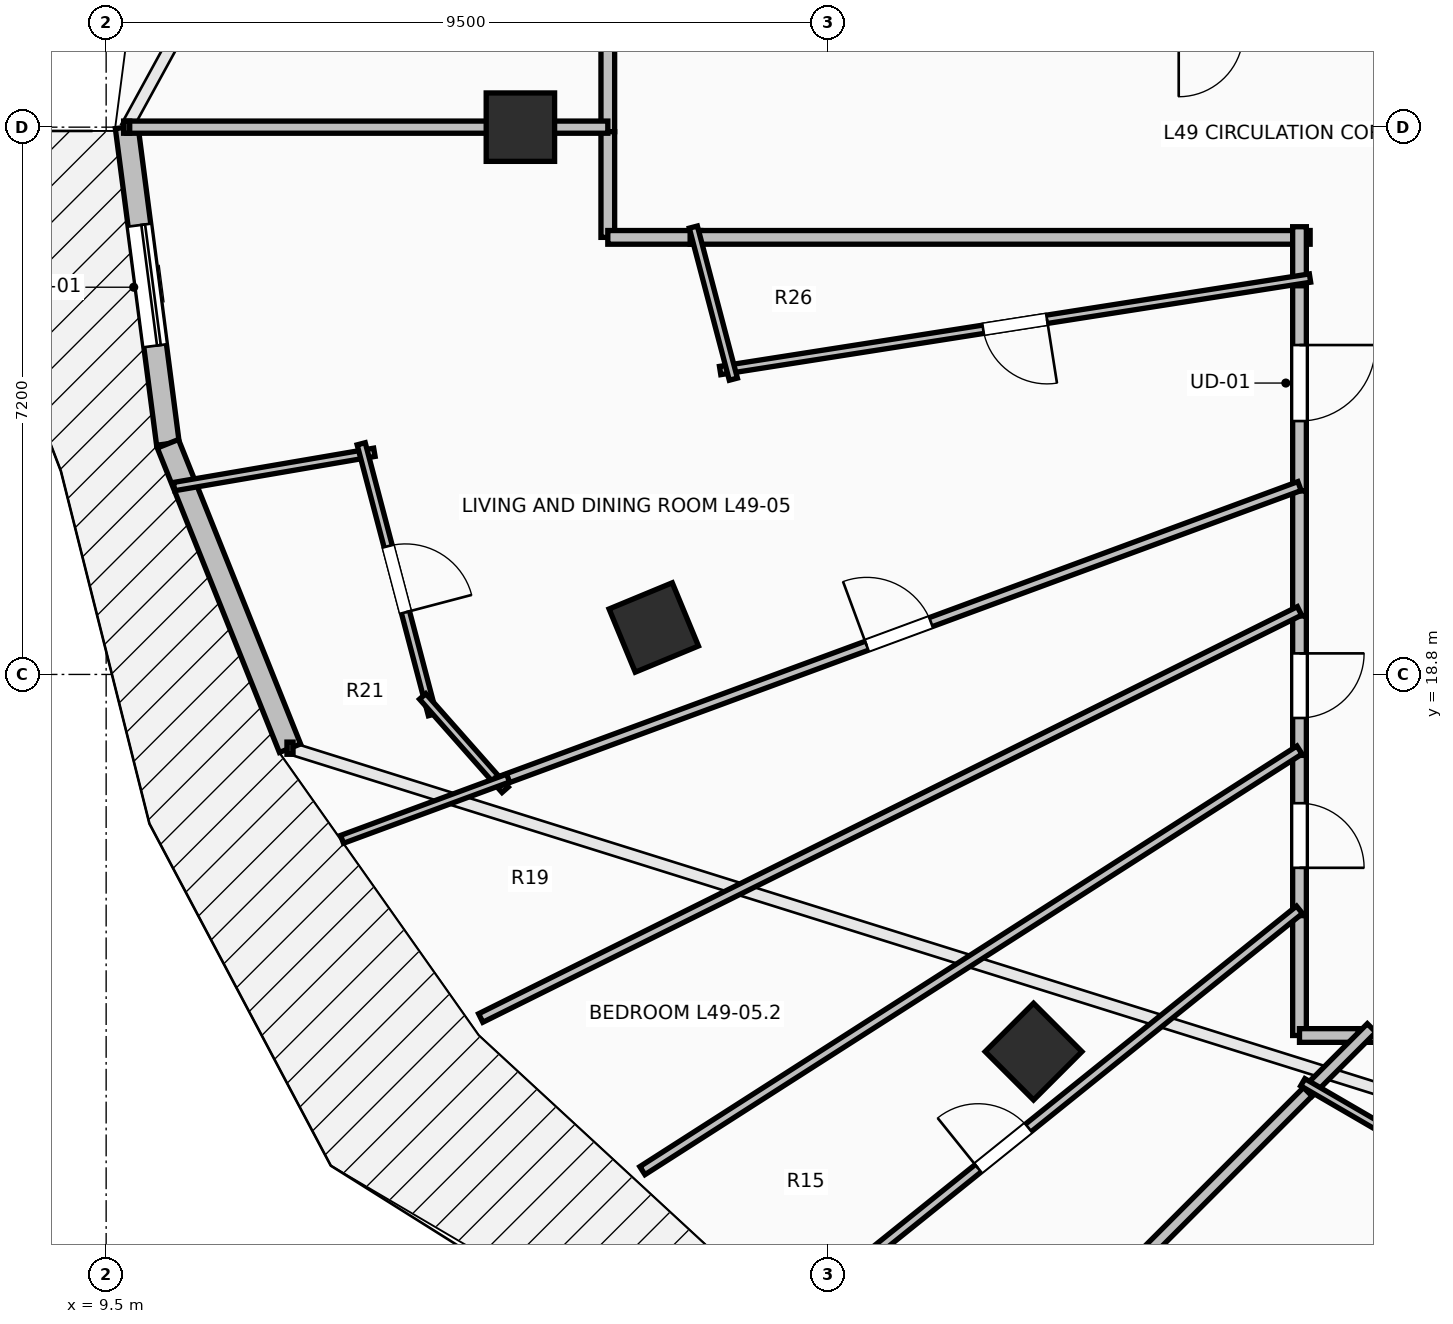
"""IFC4 building model, lengths in metres.
Left out: names, types, materials, properties, quantities, classifications, styles, units other than length and angle.
Written with IfcOpenShell. Run it as: python <this file> out.ifc"""

import sys

from ifc_helpers import new_model, si_unit, direction, frame, frame_2d, origin, origin_2d, place, context, subcontext, project, spatial, rectangle, extrude, element, fill, save


model = new_model("IFC4")
c1 = context("Model", 3, precision=1e-05, world=origin(), true_north=direction((0.0, 1.0)))
c2 = subcontext(c1, "Body", "Model", "MODEL_VIEW")
j1 = project(units=[si_unit("LENGTHUNIT", "METRE"), si_unit("PLANEANGLEUNIT", "RADIAN")], contexts=[c1])
p1 = place(None, origin())
s1 = spatial("IfcSite", under=j1, at=p1, CompositionType="ELEMENT")
p2 = place(p1, origin())
s2 = spatial("IfcBuilding", under=s1, at=p2, CompositionType="ELEMENT")
p3 = place(p2, frame((0.0, 0.0, 182.6)))
s3 = spatial("IfcBuildingStorey", under=s2, at=p3, CompositionType="ELEMENT", Elevation=182.6)
for number, where, z_axis, x_axis in (
    (1, (14.95, 26.0, 0.0), (0.0, 0.0, 1.0), (-1.0, 0.0, 0.0)),
    (2, (16.705, 19.418, 0.0), (0.0, 0.0, 1.0), (-0.924, -0.383, 0.0)),
    (3, (21.701, 13.838, 0.0), (0.0, 0.0, 1.0), (-0.707, -0.707, 0.0)),
):
    element("IfcColumn", number, at=place(p3, frame(where, z_axis=z_axis, x_axis=x_axis)), inside=s3, PredefinedType="COLUMN", context=c2, shape_type="SweptSolid", body=[
        extrude(rectangle(XDim=0.9, YDim=0.9, at=origin_2d()), origin(), (0.0, 0.0, 1.0), 3.5),
    ])
p4 = place(p3, frame((9.77, 26.0, 0.0), z_axis=(0.0, 0.0, 1.0), x_axis=(0.129147853268, -0.991625348605, 0.0)))
e4 = element("IfcWall", 4, at=p4, inside=s3, PredefinedType="STANDARD", context=c2, shape_type="SweptSolid", body=[
    extrude(rectangle(XDim=4.2, YDim=0.3, at=frame_2d((2.1, 0.0))), origin(), (0.0, 0.0, 1.0), 3.24),
])
p5 = place(p4, frame((1.3, 0.0, 0.0)))
e5 = element("IfcOpeningElement", 5, at=p5, cuts=e4, PredefinedType="OPENING", context=c2, shape_type="SweptSolid", body=[
    extrude(rectangle(XDim=1.6, YDim=2.3, at=frame_2d((0.8, 1.15))), frame((0.0, 0.165, 0.0), z_axis=(0.0, -1.0, 0.0), x_axis=(1.0, 0.0, 0.0)), (0.0, 0.0, 1.0), 0.33),
])
p6 = place(p3, frame((10.312, 21.835, 0.0), z_axis=(0.0, 0.0, 1.0), x_axis=(0.372268409848, -0.928125116043, 0.0)))
e6 = element("IfcWall", 6, at=p6, inside=s3, PredefinedType="STANDARD", context=c2, shape_type="SweptSolid", body=[
    extrude(rectangle(XDim=4.315, YDim=0.3, at=frame_2d((2.158, 0.0))), origin(), (0.0, 0.0, 1.0), 3.24),
])
p7 = place(p3, frame((16.1, 27.25, 0.0), z_axis=(0.0, 0.0, 1.0), x_axis=(0.0, -1.0, 0.0)))
e7 = element("IfcWall", 7, at=p7, inside=s3, PredefinedType="PARTITIONING", context=c2, shape_type="SweptSolid", body=[
    extrude(rectangle(XDim=1.31, YDim=0.18, at=frame_2d((0.655, 0.0))), origin(), (0.0, 0.0, 1.0), 2.432),
])
p8 = place(p3, frame((16.1, 25.94, 0.0), z_axis=(0.0, 0.0, 1.0), x_axis=(0.0, -1.0, 0.0)))
e8 = element("IfcWall", 8, at=p8, inside=s3, PredefinedType="PARTITIONING", context=c2, shape_type="SweptSolid", body=[
    extrude(rectangle(XDim=1.39, YDim=0.18, at=frame_2d((0.695, 0.0))), origin(), (0.0, 0.0, 1.0), 2.432),
])
p9 = place(p3, frame((16.1, 24.55, 0.0), z_axis=(0.0, 0.0, 1.0), x_axis=(1.0, 0.0, 0.0)))
e9 = element("IfcWall", 9, at=p9, inside=s3, PredefinedType="PARTITIONING", context=c2, shape_type="SweptSolid", body=[
    extrude(rectangle(XDim=1.223, YDim=0.18, at=frame_2d((0.611, 0.0))), origin(), (0.0, 0.0, 1.0), 3.24),
])
p10 = place(p3, frame((25.2, 24.053, 0.0), z_axis=(0.0, 0.0, 1.0), x_axis=(0.0, -1.0, 0.0)))
e10 = element("IfcWall", 10, at=p10, inside=s3, PredefinedType="PARTITIONING", context=c2, shape_type="SweptSolid", body=[
    extrude(rectangle(XDim=2.839, YDim=0.18, at=frame_2d((1.419, 0.0))), origin(), (0.0, 0.0, 1.0), 3.24),
])
p11 = place(p10, frame((0.919, 0.0, 0.0)))
e11 = element("IfcOpeningElement", 11, at=p11, cuts=e10, PredefinedType="OPENING", context=c2, shape_type="SweptSolid", body=[
    extrude(rectangle(XDim=1.0, YDim=2.15, at=frame_2d((0.5, 1.075))), frame((0.0, 0.105, 0.0), z_axis=(0.0, -1.0, 0.0), x_axis=(1.0, 0.0, 0.0)), (0.0, 0.0, 1.0), 0.21),
])
p12 = place(p3, frame((17.183, 24.55, 0.0), z_axis=(0.0, 0.0, 1.0), x_axis=(1.0, 0.0, 0.0)))
e12 = element("IfcWall", 12, at=p12, inside=s3, PredefinedType="PARTITIONING", context=c2, shape_type="SweptSolid", body=[
    extrude(rectangle(XDim=8.157, YDim=0.18, at=frame_2d((4.079, 0.0))), origin(), (0.0, 0.0, 1.0), 2.874),
])
p13 = place(p3, frame((25.2, 24.69, 0.0), z_axis=(0.0, 0.0, 1.0), x_axis=(0.0, -1.0, 0.0)))
e13 = element("IfcWall", 13, at=p13, inside=s3, PredefinedType="PARTITIONING", context=c2, shape_type="SweptSolid", body=[
    extrude(rectangle(XDim=0.777, YDim=0.18, at=frame_2d((0.388, 0.0))), origin(), (0.0, 0.0, 1.0), 3.24),
])
p14 = place(p3, frame((25.2, 21.214, 0.0), z_axis=(0.0, 0.0, 1.0), x_axis=(0.0, -1.0, 0.0)))
e14 = element("IfcWall", 14, at=p14, inside=s3, PredefinedType="PARTITIONING", context=c2, shape_type="SweptSolid", body=[
    extrude(rectangle(XDim=1.645, YDim=0.18, at=frame_2d((0.823, 0.0))), origin(), (0.0, 0.0, 1.0), 3.24),
])
p15 = place(p3, frame((25.2, 19.569, 0.0), z_axis=(0.0, 0.0, 1.0), x_axis=(0.0, -1.0, 0.0)))
e15 = element("IfcWall", 15, at=p15, inside=s3, PredefinedType="PARTITIONING", context=c2, shape_type="SweptSolid", body=[
    extrude(rectangle(XDim=1.834, YDim=0.18, at=frame_2d((0.917, 0.0))), origin(), (0.0, 0.0, 1.0), 3.24),
])
p16 = place(p15, frame((0.492, 0.0, 0.0)))
e16 = element("IfcOpeningElement", 16, at=p16, cuts=e15, PredefinedType="OPENING", context=c2, shape_type="SweptSolid", body=[
    extrude(rectangle(XDim=0.85, YDim=2.1, at=frame_2d((0.425, 1.05))), frame((0.0, 0.105, 0.0), z_axis=(0.0, -1.0, 0.0), x_axis=(1.0, 0.0, 0.0)), (0.0, 0.0, 1.0), 0.21),
])
p17 = place(p3, frame((25.2, 17.735, 0.0), z_axis=(0.0, 0.0, 1.0), x_axis=(0.0, -1.0, 0.0)))
e17 = element("IfcWall", 17, at=p17, inside=s3, PredefinedType="PARTITIONING", context=c2, shape_type="SweptSolid", body=[
    extrude(rectangle(XDim=2.108, YDim=0.18, at=frame_2d((1.054, 0.0))), origin(), (0.0, 0.0, 1.0), 2.432),
])
p18 = place(p17, frame((0.629, 0.0, 0.0)))
e18 = element("IfcOpeningElement", 18, at=p18, cuts=e17, PredefinedType="OPENING", context=c2, shape_type="SweptSolid", body=[
    extrude(rectangle(XDim=0.85, YDim=2.1, at=frame_2d((0.425, 1.05))), frame((0.0, 0.105, 0.0), z_axis=(0.0, -1.0, 0.0), x_axis=(1.0, 0.0, 0.0)), (0.0, 0.0, 1.0), 0.21),
])
p19 = place(p3, frame((25.2, 15.627, 0.0), z_axis=(0.0, 0.0, 1.0), x_axis=(0.0, -1.0, 0.0)))
e19 = element("IfcWall", 19, at=p19, inside=s3, PredefinedType="PARTITIONING", context=c2, shape_type="SweptSolid", body=[
    extrude(rectangle(XDim=1.577, YDim=0.18, at=frame_2d((0.789, 0.0))), origin(), (0.0, 0.0, 1.0), 2.432),
])
p20 = place(p3, frame((25.2, 14.05, 0.0), z_axis=(0.0, 0.0, 1.0), x_axis=(1.0, 0.0, 0.0)))
e20 = element("IfcWall", 20, at=p20, inside=s3, PredefinedType="PARTITIONING", context=c2, shape_type="SweptSolid", body=[
    extrude(rectangle(XDim=0.91, YDim=0.18, at=frame_2d((0.455, 0.0))), origin(), (0.0, 0.0, 1.0), 2.874),
])
p21 = place(p3, frame((25.97, 14.05, 0.0), z_axis=(0.0, 0.0, 1.0), x_axis=(1.0, 0.0, 0.0)))
e21 = element("IfcWall", 21, at=p21, inside=s3, PredefinedType="PARTITIONING", context=c2, shape_type="SweptSolid", body=[
    extrude(rectangle(XDim=3.385, YDim=0.18, at=frame_2d((1.692, 0.0))), origin(), (0.0, 0.0, 1.0), 2.432),
])
p22 = place(p3, frame((9.771, 26.0, 0.0), z_axis=(0.0, 0.0, 1.0), x_axis=(1.0, 0.0, 0.0)))
e22 = element("IfcWall", 22, at=p22, inside=s3, PredefinedType="PARTITIONING", context=c2, shape_type="SweptSolid", body=[
    extrude(rectangle(XDim=6.329, YDim=0.16, at=frame_2d((3.165, 0.0))), origin(), (0.0, 0.0, 1.0), 2.432),
])
p23 = place(p3, frame((25.338, 24.015, 0.0), z_axis=(0.0, 0.0, 1.0), x_axis=(-0.987940229144, -0.154835731144, 0.0)))
e23 = element("IfcWall", 23, at=p23, inside=s3, PredefinedType="PARTITIONING", context=c2, shape_type="SweptSolid", body=[
    extrude(rectangle(XDim=7.855, YDim=0.11, at=frame_2d((3.928, 0.0))), origin(), (0.0, 0.0, 1.0), 2.874),
])
p24 = place(p23, frame((3.503, 0.0, 0.0)))
e24 = element("IfcOpeningElement", 24, at=p24, cuts=e23, PredefinedType="OPENING", context=c2, shape_type="SweptSolid", body=[
    extrude(rectangle(XDim=0.85, YDim=2.1, at=frame_2d((0.425, 1.05))), frame((0.0, 0.07, 0.0), z_axis=(0.0, -1.0, 0.0), x_axis=(1.0, 0.0, 0.0)), (0.0, 0.0, 1.0), 0.14),
])
p25 = place(p3, frame((17.752, 22.685, 0.0), z_axis=(0.0, 0.0, 1.0), x_axis=(-0.254429402158, 0.967091350038, 0.0)))
e25 = element("IfcWall", 25, at=p25, inside=s3, PredefinedType="PARTITIONING", context=c2, shape_type="SweptSolid", body=[
    extrude(rectangle(XDim=2.069, YDim=0.11, at=frame_2d((1.034, 0.0))), origin(), (0.0, 0.0, 1.0), 3.24),
])
p26 = place(p3, frame((10.394, 21.271, 0.0), z_axis=(0.0, 0.0, 1.0), x_axis=(0.985656128296, 0.168766100722, 0.0)))
e26 = element("IfcWall", 26, at=p26, inside=s3, PredefinedType="PARTITIONING", context=c2, shape_type="SweptSolid", body=[
    extrude(rectangle(XDim=2.673, YDim=0.11, at=frame_2d((1.337, 0.0))), origin(), (0.0, 0.0, 1.0), 3.24),
])
p27 = place(p3, frame((12.855, 21.834, 0.0), z_axis=(0.0, 0.0, 1.0), x_axis=(0.254271540361, -0.967132867688, 0.0)))
e27 = element("IfcWall", 27, at=p27, inside=s3, PredefinedType="PARTITIONING", context=c2, shape_type="SweptSolid", body=[
    extrude(rectangle(XDim=3.685, YDim=0.11, at=frame_2d((1.843, 0.0))), origin(), (0.0, 0.0, 1.0), 3.24),
])
p28 = place(p27, frame((1.393, 0.0, 0.0)))
e28 = element("IfcOpeningElement", 28, at=p28, cuts=e27, PredefinedType="OPENING", context=c2, shape_type="SweptSolid", body=[
    extrude(rectangle(XDim=0.9, YDim=2.1, at=frame_2d((0.45, 1.05))), frame((0.0, 0.07, 0.0), z_axis=(0.0, -1.0, 0.0), x_axis=(1.0, 0.0, 0.0)), (0.0, 0.0, 1.0), 0.14),
])
p29 = place(p3, frame((13.664, 18.511, 0.0), z_axis=(0.0, 0.0, 1.0), x_axis=(0.662345628205, -0.749198417509, 0.0)))
e29 = element("IfcWall", 29, at=p29, inside=s3, PredefinedType="PARTITIONING", context=c2, shape_type="SweptSolid", body=[
    extrude(rectangle(XDim=1.639, YDim=0.11, at=frame_2d((0.819, 0.0))), origin(), (0.0, 0.0, 1.0), 3.24),
])
p30 = place(p3, frame((14.657, 17.388, 0.0), z_axis=(0.0, 0.0, 1.0), x_axis=(0.938173124492, 0.346166417322, 0.0)))
e30 = element("IfcWall", 30, at=p30, inside=s3, PredefinedType="PARTITIONING", context=c2, shape_type="SweptSolid", body=[
    extrude(rectangle(XDim=11.238, YDim=0.125, at=frame_2d((5.619, 0.0))), origin(), (0.0, 0.0, 1.0), 2.432),
])
p31 = place(p30, frame((5.169, 0.0, 0.0)))
e31 = element("IfcOpeningElement", 31, at=p31, cuts=e30, PredefinedType="OPENING", context=c2, shape_type="SweptSolid", body=[
    extrude(rectangle(XDim=0.9, YDim=2.1, at=frame_2d((0.45, 1.05))), frame((0.0, 0.077, 0.0), z_axis=(0.0, -1.0, 0.0), x_axis=(1.0, 0.0, 0.0)), (0.0, 0.0, 1.0), 0.155),
])
p32 = place(p3, frame((12.604, 16.631, 0.0), z_axis=(0.0, 0.0, 1.0), x_axis=(0.938194450562, 0.346108614361, 0.0)))
e32 = element("IfcWall", 32, at=p32, inside=s3, PredefinedType="PARTITIONING", context=c2, shape_type="SweptSolid", body=[
    extrude(rectangle(XDim=2.328, YDim=0.11, at=frame_2d((1.164, 0.0))), origin(), (0.0, 0.0, 1.0), 3.24),
])
p33 = place(p3, frame((14.428, 14.28, 0.0), z_axis=(0.0, 0.0, 1.0), x_axis=(0.895423439435, 0.44521552546, 0.0)))
e33 = element("IfcWall", 33, at=p33, inside=s3, PredefinedType="PARTITIONING", context=c2, shape_type="SweptSolid", body=[
    extrude(rectangle(XDim=12.03, YDim=0.125, at=frame_2d((6.015, 0.0))), origin(), (0.0, 0.0, 1.0), 2.432),
])
p34 = place(p3, frame((16.555, 12.272, 0.0), z_axis=(0.0, 0.0, 1.0), x_axis=(0.842221721565, 0.539131312135, 0.0)))
e34 = element("IfcWall", 34, at=p34, inside=s3, PredefinedType="PARTITIONING", context=c2, shape_type="SweptSolid", body=[
    extrude(rectangle(XDim=10.265, YDim=0.125, at=frame_2d((5.132, 0.0))), origin(), (0.0, 0.0, 1.0), 2.432),
])
p35 = place(p3, frame((18.715, 10.487, 0.0), z_axis=(0.0, 0.0, 1.0), x_axis=(0.779157389419, 0.626828335762, 0.0)))
e35 = element("IfcWall", 35, at=p35, inside=s3, PredefinedType="PARTITIONING", context=c2, shape_type="SweptSolid", body=[
    extrude(rectangle(XDim=8.323, YDim=0.125, at=frame_2d((4.162, 0.0))), origin(), (0.0, 0.0, 1.0), 2.432),
])
p36 = place(p35, frame((2.896, 0.0, 0.0)))
e36 = element("IfcOpeningElement", 36, at=p36, cuts=e35, PredefinedType="OPENING", context=c2, shape_type="SweptSolid", body=[
    extrude(rectangle(XDim=0.85, YDim=2.1, at=frame_2d((0.425, 1.05))), frame((0.0, 0.077, 0.0), z_axis=(0.0, -1.0, 0.0), x_axis=(1.0, 0.0, 0.0)), (0.0, 0.0, 1.0), 0.155),
])
p37 = place(p3, frame((21.041, 9.041, 0.0), z_axis=(0.0, 0.0, 1.0), x_axis=(0.707106781187, 0.707106781187, 0.0)))
e37 = element("IfcWall", 37, at=p37, inside=s3, PredefinedType="PARTITIONING", context=c2, shape_type="SweptSolid", body=[
    extrude(rectangle(XDim=6.176, YDim=0.16, at=frame_2d((3.088, 0.0))), origin(), (0.0, 0.0, 1.0), 2.774),
])
p38 = place(p3, frame((25.309, 13.309, 0.0), z_axis=(0.0, 0.0, 1.0), x_axis=(0.707106781187, 0.707106781187, 0.0)))
e38 = element("IfcWall", 38, at=p38, inside=s3, PredefinedType="PARTITIONING", context=c2, shape_type="SweptSolid", body=[
    extrude(rectangle(XDim=1.188, YDim=0.16, at=frame_2d((0.594, 0.0))), origin(), (0.0, 0.0, 1.0), 2.874),
])
p39 = place(p3, frame((27.568, 12.083, 0.0), z_axis=(0.0, 0.0, 1.0), x_axis=(-0.864515441931, 0.502606258082, 0.0)))
e39 = element("IfcWall", 39, at=p39, inside=s3, PredefinedType="PARTITIONING", context=c2, shape_type="SweptSolid", body=[
    extrude(rectangle(XDim=2.69, YDim=0.11, at=frame_2d((1.345, 0.0))), origin(), (0.0, 0.0, 1.0), 3.24),
])
p40 = place(p5, origin())
e40 = element("IfcDoor", 40, at=p40, inside=s3, OperationType="SLIDING_TO_LEFT", PredefinedType="DOOR", context=c2, shape_type="SweptSolid", body=[
    extrude(rectangle(XDim=1.6, YDim=2.3, at=frame_2d((0.8, 1.15))), frame((0.0, 0.025, 0.0), z_axis=(0.0, -1.0, 0.0), x_axis=(1.0, 0.0, 0.0)), (0.0, 0.0, 1.0), 0.05),
])
fill(e5, e40)
p41 = place(p11, origin())
e41 = element("IfcDoor", 41, at=p41, inside=s3, OperationType="SINGLE_SWING_LEFT", PredefinedType="DOOR", context=c2, shape_type="SweptSolid", body=[
    extrude(rectangle(XDim=1.0, YDim=2.15, at=frame_2d((0.5, 1.075))), frame((0.0, 0.025, 0.0), z_axis=(0.0, -1.0, 0.0), x_axis=(1.0, 0.0, 0.0)), (0.0, 0.0, 1.0), 0.05),
])
fill(e11, e41)
p42 = place(p24, origin())
e42 = element("IfcDoor", 42, at=p42, inside=s3, OperationType="SINGLE_SWING_LEFT", PredefinedType="DOOR", context=c2, shape_type="SweptSolid", body=[
    extrude(rectangle(XDim=0.85, YDim=2.1, at=frame_2d((0.425, 1.05))), frame((0.0, 0.025, 0.0), z_axis=(0.0, -1.0, 0.0), x_axis=(1.0, 0.0, 0.0)), (0.0, 0.0, 1.0), 0.05),
])
fill(e24, e42)
p43 = place(p28, origin())
e43 = element("IfcDoor", 43, at=p43, inside=s3, OperationType="SINGLE_SWING_RIGHT", PredefinedType="DOOR", context=c2, shape_type="SweptSolid", body=[
    extrude(rectangle(XDim=0.9, YDim=2.1, at=frame_2d((0.45, 1.05))), frame((0.0, 0.025, 0.0), z_axis=(0.0, -1.0, 0.0), x_axis=(1.0, 0.0, 0.0)), (0.0, 0.0, 1.0), 0.05),
])
fill(e28, e43)
p44 = place(p31, origin())
e44 = element("IfcDoor", 44, at=p44, inside=s3, OperationType="SINGLE_SWING_LEFT", PredefinedType="DOOR", context=c2, shape_type="SweptSolid", body=[
    extrude(rectangle(XDim=0.9, YDim=2.1, at=frame_2d((0.45, 1.05))), frame((0.0, 0.025, 0.0), z_axis=(0.0, -1.0, 0.0), x_axis=(1.0, 0.0, 0.0)), (0.0, 0.0, 1.0), 0.05),
])
fill(e31, e44)
p45 = place(p16, origin())
e45 = element("IfcDoor", 45, at=p45, inside=s3, OperationType="SINGLE_SWING_LEFT", PredefinedType="DOOR", context=c2, shape_type="SweptSolid", body=[
    extrude(rectangle(XDim=0.85, YDim=2.1, at=frame_2d((0.425, 1.05))), frame((0.0, 0.025, 0.0), z_axis=(0.0, -1.0, 0.0), x_axis=(1.0, 0.0, 0.0)), (0.0, 0.0, 1.0), 0.05),
])
fill(e16, e45)
p46 = place(p18, origin())
e46 = element("IfcDoor", 46, at=p46, inside=s3, OperationType="SINGLE_SWING_RIGHT", PredefinedType="DOOR", context=c2, shape_type="SweptSolid", body=[
    extrude(rectangle(XDim=0.85, YDim=2.1, at=frame_2d((0.425, 1.05))), frame((0.0, 0.025, 0.0), z_axis=(0.0, -1.0, 0.0), x_axis=(1.0, 0.0, 0.0)), (0.0, 0.0, 1.0), 0.05),
])
fill(e18, e46)
p47 = place(p36, origin())
e47 = element("IfcDoor", 47, at=p47, inside=s3, OperationType="SINGLE_SWING_LEFT", PredefinedType="DOOR", context=c2, shape_type="SweptSolid", body=[
    extrude(rectangle(XDim=0.85, YDim=2.1, at=frame_2d((0.425, 1.05))), frame((0.0, 0.025, 0.0), z_axis=(0.0, -1.0, 0.0), x_axis=(1.0, 0.0, 0.0)), (0.0, 0.0, 1.0), 0.05),
])
fill(e36, e47)
save(model, sys.argv[1])
